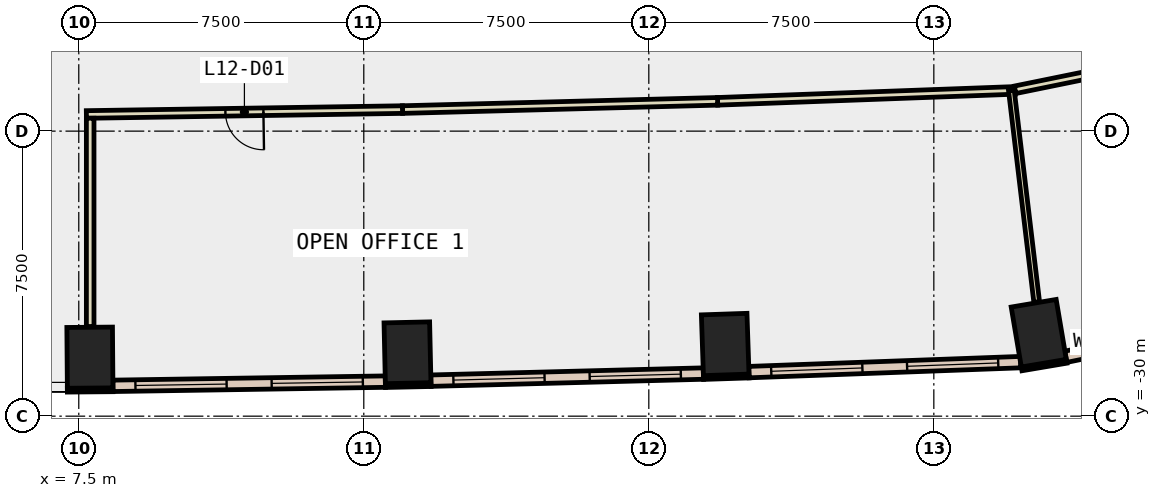
"""IFC4 building model, lengths in metres.
Left out: names, types, materials, properties, quantities, classifications, styles, units other than length and angle.
Written with IfcOpenShell. Run it as: python <this file> out.ifc"""

import sys

from ifc_helpers import new_model, si_unit, direction, frame, frame_2d, origin, origin_2d, place, context, subcontext, project, spatial, rectangle, extrude, element, fill, save


model = new_model("IFC4")
c1 = context("Model", 3, precision=1e-05, world=origin(), true_north=direction((0.0, 1.0)))
c2 = subcontext(c1, "Body", "Model", "MODEL_VIEW")
j1 = project(units=[si_unit("LENGTHUNIT", "METRE"), si_unit("PLANEANGLEUNIT", "RADIAN")], contexts=[c1])
p1 = place(None, origin())
s1 = spatial("IfcSite", under=j1, at=p1, CompositionType="ELEMENT")
p2 = place(p1, origin())
s2 = spatial("IfcBuilding", under=s1, at=p2, CompositionType="ELEMENT")
p3 = place(p2, frame((0.0, 0.0, 60.2)))
s3 = spatial("IfcBuildingStorey", under=s2, at=p3, CompositionType="ELEMENT", Elevation=60.2)
for number, where, z_axis, x_axis in (
    (1, (7.793, -28.461, -0.4), (0.0, 0.0, 1.0), (1.0, 0.008, 0.0)),
    (2, (16.15, -28.332, -0.4), (0.0, 0.0, 1.0), (1.0, 0.022, 0.0)),
    (3, (24.51, -28.114, -0.4), (0.0, 0.0, 1.0), (0.999, 0.034, 0.0)),
    (4, (32.761, -27.818, -0.4), (0.0, 0.0, 1.0), (0.986, 0.167, 0.0)),
):
    element("IfcColumn", number, at=place(p3, frame(where, z_axis=z_axis, x_axis=x_axis)), inside=s3, PredefinedType="COLUMN", context=c2, shape_type="SweptSolid", body=[
        extrude(rectangle(XDim=1.2, YDim=1.6, at=origin_2d()), origin(), (0.0, 0.0, 1.0), 4.2),
    ])
p4 = place(p3, frame((7.2, -29.316, 0.0), z_axis=(0.0, 0.0, 1.0), x_axis=(0.999965208912, 0.008341520563, 0.0)))
e5 = element("IfcWall", 5, at=p4, inside=s3, PredefinedType="STANDARD", context=c2, shape_type="SweptSolid", body=[
    extrude(rectangle(XDim=1.2, YDim=0.1, at=frame_2d((0.6, 0.0))), origin(), (0.0, 0.0, 1.0), 3.8),
])
p5 = place(p3, frame((15.569, -29.195, 0.0), z_axis=(0.0, 0.0, 1.0), x_axis=(0.999763115755, 0.021764934565, 0.0)))
e6 = element("IfcWall", 6, at=p5, inside=s3, PredefinedType="STANDARD", context=c2, shape_type="SweptSolid", body=[
    extrude(rectangle(XDim=1.2, YDim=0.1, at=frame_2d((0.6, 0.0))), origin(), (0.0, 0.0, 1.0), 3.8),
])
for number, where, z_axis, x_axis in (
    (7, (23.939, -28.983, 0.0), (0.0, 0.0, 1.0), (0.999, 0.033, 0.0)),
    (8, (32.311, -28.756, 0.0), (0.0, 0.0, 1.0), (0.986, 0.167, 0.0)),
):
    element("IfcWall", number, at=place(p3, frame(where, z_axis=z_axis, x_axis=x_axis)), inside=s3, PredefinedType="STANDARD", context=c2, shape_type="SweptSolid", body=[
        extrude(rectangle(XDim=1.2, YDim=0.1, at=frame_2d((0.6, 0.0))), origin(), (0.0, 0.0, 1.0), 3.8),
    ])
p6 = place(p3, frame((8.398, -29.202, 0.0), z_axis=(0.0, 0.0, 1.0), x_axis=(0.99988053916, 0.015456629942, 0.0)))
e9 = element("IfcWall", 9, at=p6, inside=s3, PredefinedType="STANDARD", context=c2, shape_type="SweptSolid", body=[
    extrude(rectangle(XDim=7.171, YDim=0.3, at=frame_2d((3.585, 0.0))), origin(), (0.0, 0.0, 1.0), 3.8),
])
p7 = place(p6, frame((0.593, 0.0, 0.9)))
e10 = element("IfcOpeningElement", 10, at=p7, cuts=e9, PredefinedType="OPENING", context=c2, shape_type="SweptSolid", body=[
    extrude(rectangle(XDim=2.4, YDim=2.6, at=frame_2d((1.2, 1.3))), frame((0.0, 0.16, 0.0), z_axis=(0.0, -1.0, 0.0), x_axis=(1.0, 0.0, 0.0)), (0.0, 0.0, 1.0), 0.32),
])
p8 = place(p6, frame((4.178, 0.0, 0.9)))
e11 = element("IfcOpeningElement", 11, at=p8, cuts=e9, PredefinedType="OPENING", context=c2, shape_type="SweptSolid", body=[
    extrude(rectangle(XDim=2.4, YDim=2.6, at=frame_2d((1.2, 1.3))), frame((0.0, 0.16, 0.0), z_axis=(0.0, -1.0, 0.0), x_axis=(1.0, 0.0, 0.0)), (0.0, 0.0, 1.0), 0.32),
])
p9 = place(p3, frame((16.765, -29.066, 0.0), z_axis=(0.0, 0.0, 1.0), x_axis=(0.999660132619, 0.026069508106, 0.0)))
e12 = element("IfcWall", 12, at=p9, inside=s3, PredefinedType="STANDARD", context=c2, shape_type="SweptSolid", body=[
    extrude(rectangle(XDim=7.174, YDim=0.3, at=frame_2d((3.587, 0.0))), origin(), (0.0, 0.0, 1.0), 3.8),
])
p10 = place(p9, frame((0.593, 0.0, 0.9)))
e13 = element("IfcOpeningElement", 13, at=p10, cuts=e12, PredefinedType="OPENING", context=c2, shape_type="SweptSolid", body=[
    extrude(rectangle(XDim=2.4, YDim=2.6, at=frame_2d((1.2, 1.3))), frame((0.0, 0.16, 0.0), z_axis=(0.0, -1.0, 0.0), x_axis=(1.0, 0.0, 0.0)), (0.0, 0.0, 1.0), 0.32),
])
p11 = place(p9, frame((4.18, 0.0, 0.9)))
e14 = element("IfcOpeningElement", 14, at=p11, cuts=e12, PredefinedType="OPENING", context=c2, shape_type="SweptSolid", body=[
    extrude(rectangle(XDim=2.4, YDim=2.6, at=frame_2d((1.2, 1.3))), frame((0.0, 0.16, 0.0), z_axis=(0.0, -1.0, 0.0), x_axis=(1.0, 0.0, 0.0)), (0.0, 0.0, 1.0), 0.32),
])
p12 = place(p3, frame((25.134, -28.841, 0.0), z_axis=(0.0, 0.0, 1.0), x_axis=(0.999322852286, 0.036794522671, 0.0)))
e15 = element("IfcWall", 15, at=p12, inside=s3, PredefinedType="STANDARD", context=c2, shape_type="SweptSolid", body=[
    extrude(rectangle(XDim=7.153, YDim=0.3, at=frame_2d((3.576, 0.0))), origin(), (0.0, 0.0, 1.0), 3.8),
])
p13 = place(p12, frame((0.588, 0.0, 0.9)))
e16 = element("IfcOpeningElement", 16, at=p13, cuts=e15, PredefinedType="OPENING", context=c2, shape_type="SweptSolid", body=[
    extrude(rectangle(XDim=2.4, YDim=2.6, at=frame_2d((1.2, 1.3))), frame((0.0, 0.16, 0.0), z_axis=(0.0, -1.0, 0.0), x_axis=(1.0, 0.0, 0.0)), (0.0, 0.0, 1.0), 0.32),
])
p14 = place(p12, frame((4.165, 0.0, 0.9)))
e17 = element("IfcOpeningElement", 17, at=p14, cuts=e15, PredefinedType="OPENING", context=c2, shape_type="SweptSolid", body=[
    extrude(rectangle(XDim=2.4, YDim=2.6, at=frame_2d((1.2, 1.3))), frame((0.0, 0.16, 0.0), z_axis=(0.0, -1.0, 0.0), x_axis=(1.0, 0.0, 0.0)), (0.0, 0.0, 1.0), 0.32),
])
p15 = place(p3, frame((33.473, -28.437, 0.0), z_axis=(0.0, 0.0, 1.0), x_axis=(0.979824229846, 0.199861148317, 0.0)))
e18 = element("IfcWall", 18, at=p15, inside=s3, PredefinedType="STANDARD", context=c2, shape_type="SweptSolid", body=[
    extrude(rectangle(XDim=3.822, YDim=0.3, at=frame_2d((1.911, 0.0))), origin(), (0.0, 0.0, 1.0), 3.8),
])
p16 = place(p15, frame((1.211, 0.0, 0.9)))
e19 = element("IfcOpeningElement", 19, at=p16, cuts=e18, PredefinedType="OPENING", context=c2, shape_type="SweptSolid", body=[
    extrude(rectangle(XDim=1.4, YDim=2.6, at=frame_2d((0.7, 1.3))), frame((0.0, 0.16, 0.0), z_axis=(0.0, -1.0, 0.0), x_axis=(1.0, 0.0, 0.0)), (0.0, 0.0, 1.0), 0.32),
])
p17 = place(p3, frame((32.141, -21.428, 0.0), z_axis=(0.0, 0.0, 1.0), x_axis=(-0.999324021202, -0.036762761723, 0.0)))
e20 = element("IfcWall", 20, at=p17, inside=s3, PredefinedType="PARTITIONING", context=c2, shape_type="SweptSolid", body=[
    extrude(rectangle(XDim=7.836, YDim=0.2, at=frame_2d((3.918, 0.0))), origin(), (0.0, 0.0, 1.0), 3.8),
])
p18 = place(p3, frame((24.31, -21.716, 0.0), z_axis=(0.0, 0.0, 1.0), x_axis=(-0.999657616542, -0.02616581148, 0.0)))
e21 = element("IfcWall", 21, at=p18, inside=s3, PredefinedType="PARTITIONING", context=c2, shape_type="SweptSolid", body=[
    extrude(rectangle(XDim=8.295, YDim=0.2, at=frame_2d((4.147, 0.0))), origin(), (0.0, 0.0, 1.0), 3.8),
])
p19 = place(p3, frame((16.018, -21.933, 0.0), z_axis=(0.0, 0.0, 1.0), x_axis=(-0.999879942341, -0.015495189738, 0.0)))
e22 = element("IfcWall", 22, at=p19, inside=s3, PredefinedType="PARTITIONING", context=c2, shape_type="SweptSolid", body=[
    extrude(rectangle(XDim=8.319, YDim=0.2, at=frame_2d((4.16, 0.0))), origin(), (0.0, 0.0, 1.0), 3.8),
])
p20 = place(p19, frame((3.66, 0.0, 0.0)))
e23 = element("IfcOpeningElement", 23, at=p20, cuts=e22, PredefinedType="OPENING", context=c2, shape_type="SweptSolid", body=[
    extrude(rectangle(XDim=1.0, YDim=2.1, at=frame_2d((0.5, 1.05))), frame((0.0, 0.11, 0.0), z_axis=(0.0, -1.0, 0.0), x_axis=(1.0, 0.0, 0.0)), (0.0, 0.0, 1.0), 0.22),
])
p21 = place(p3, frame((34.523, -20.926, 0.0), z_axis=(0.0, 0.0, 1.0), x_axis=(-0.979840552367, -0.199781110063, 0.0)))
e24 = element("IfcWall", 24, at=p21, inside=s3, PredefinedType="PARTITIONING", context=c2, shape_type="SweptSolid", body=[
    extrude(rectangle(XDim=2.433, YDim=0.2, at=frame_2d((1.217, 0.0))), origin(), (0.0, 0.0, 1.0), 3.8),
])
p22 = place(p3, frame((7.8, -22.16, 0.0), z_axis=(0.0, 0.0, 1.0), x_axis=(0.0, -1.0, 0.0)))
e25 = element("IfcWall", 25, at=p22, inside=s3, PredefinedType="PARTITIONING", context=c2, shape_type="SweptSolid", body=[
    extrude(rectangle(XDim=5.481, YDim=0.2, at=frame_2d((2.741, 0.0))), origin(), (0.0, 0.0, 1.0), 3.8),
])
p23 = place(p3, frame((32.041, -21.432, 0.0), z_axis=(0.0, 0.0, 1.0), x_axis=(0.118848018273, -0.992912457648, 0.0)))
e26 = element("IfcWall", 26, at=p23, inside=s3, PredefinedType="PARTITIONING", context=c2, shape_type="SweptSolid", body=[
    extrude(rectangle(XDim=5.604, YDim=0.15, at=frame_2d((2.802, 0.0))), origin(), (0.0, 0.0, 1.0), 3.8),
])
p24 = place(p7, origin())
e27 = element("IfcWindow", 27, at=p24, inside=s3, PartitioningType="SINGLE_PANEL", PredefinedType="WINDOW", context=c2, shape_type="SweptSolid", body=[
    extrude(rectangle(XDim=2.4, YDim=2.6, at=frame_2d((1.2, 1.3))), frame((0.0, 0.03, 0.0), z_axis=(0.0, -1.0, 0.0), x_axis=(1.0, 0.0, 0.0)), (0.0, 0.0, 1.0), 0.06),
])
fill(e10, e27)
p25 = place(p8, origin())
e28 = element("IfcWindow", 28, at=p25, inside=s3, PartitioningType="SINGLE_PANEL", PredefinedType="WINDOW", context=c2, shape_type="SweptSolid", body=[
    extrude(rectangle(XDim=2.4, YDim=2.6, at=frame_2d((1.2, 1.3))), frame((0.0, 0.03, 0.0), z_axis=(0.0, -1.0, 0.0), x_axis=(1.0, 0.0, 0.0)), (0.0, 0.0, 1.0), 0.06),
])
fill(e11, e28)
p26 = place(p10, origin())
e29 = element("IfcWindow", 29, at=p26, inside=s3, PartitioningType="SINGLE_PANEL", PredefinedType="WINDOW", context=c2, shape_type="SweptSolid", body=[
    extrude(rectangle(XDim=2.4, YDim=2.6, at=frame_2d((1.2, 1.3))), frame((0.0, 0.03, 0.0), z_axis=(0.0, -1.0, 0.0), x_axis=(1.0, 0.0, 0.0)), (0.0, 0.0, 1.0), 0.06),
])
fill(e13, e29)
p27 = place(p11, origin())
e30 = element("IfcWindow", 30, at=p27, inside=s3, PartitioningType="SINGLE_PANEL", PredefinedType="WINDOW", context=c2, shape_type="SweptSolid", body=[
    extrude(rectangle(XDim=2.4, YDim=2.6, at=frame_2d((1.2, 1.3))), frame((0.0, 0.03, 0.0), z_axis=(0.0, -1.0, 0.0), x_axis=(1.0, 0.0, 0.0)), (0.0, 0.0, 1.0), 0.06),
])
fill(e14, e30)
p28 = place(p13, origin())
e31 = element("IfcWindow", 31, at=p28, inside=s3, PartitioningType="SINGLE_PANEL", PredefinedType="WINDOW", context=c2, shape_type="SweptSolid", body=[
    extrude(rectangle(XDim=2.4, YDim=2.6, at=frame_2d((1.2, 1.3))), frame((0.0, 0.03, 0.0), z_axis=(0.0, -1.0, 0.0), x_axis=(1.0, 0.0, 0.0)), (0.0, 0.0, 1.0), 0.06),
])
fill(e16, e31)
p29 = place(p14, origin())
e32 = element("IfcWindow", 32, at=p29, inside=s3, PartitioningType="SINGLE_PANEL", PredefinedType="WINDOW", context=c2, shape_type="SweptSolid", body=[
    extrude(rectangle(XDim=2.4, YDim=2.6, at=frame_2d((1.2, 1.3))), frame((0.0, 0.03, 0.0), z_axis=(0.0, -1.0, 0.0), x_axis=(1.0, 0.0, 0.0)), (0.0, 0.0, 1.0), 0.06),
])
fill(e17, e32)
p30 = place(p20, origin())
e33 = element("IfcDoor", 33, at=p30, inside=s3, OperationType="SINGLE_SWING_LEFT", PredefinedType="DOOR", context=c2, shape_type="SweptSolid", body=[
    extrude(rectangle(XDim=1.0, YDim=2.1, at=frame_2d((0.5, 1.05))), frame((0.0, 0.025, 0.0), z_axis=(0.0, -1.0, 0.0), x_axis=(1.0, 0.0, 0.0)), (0.0, 0.0, 1.0), 0.05),
])
fill(e23, e33)
save(model, sys.argv[1])
